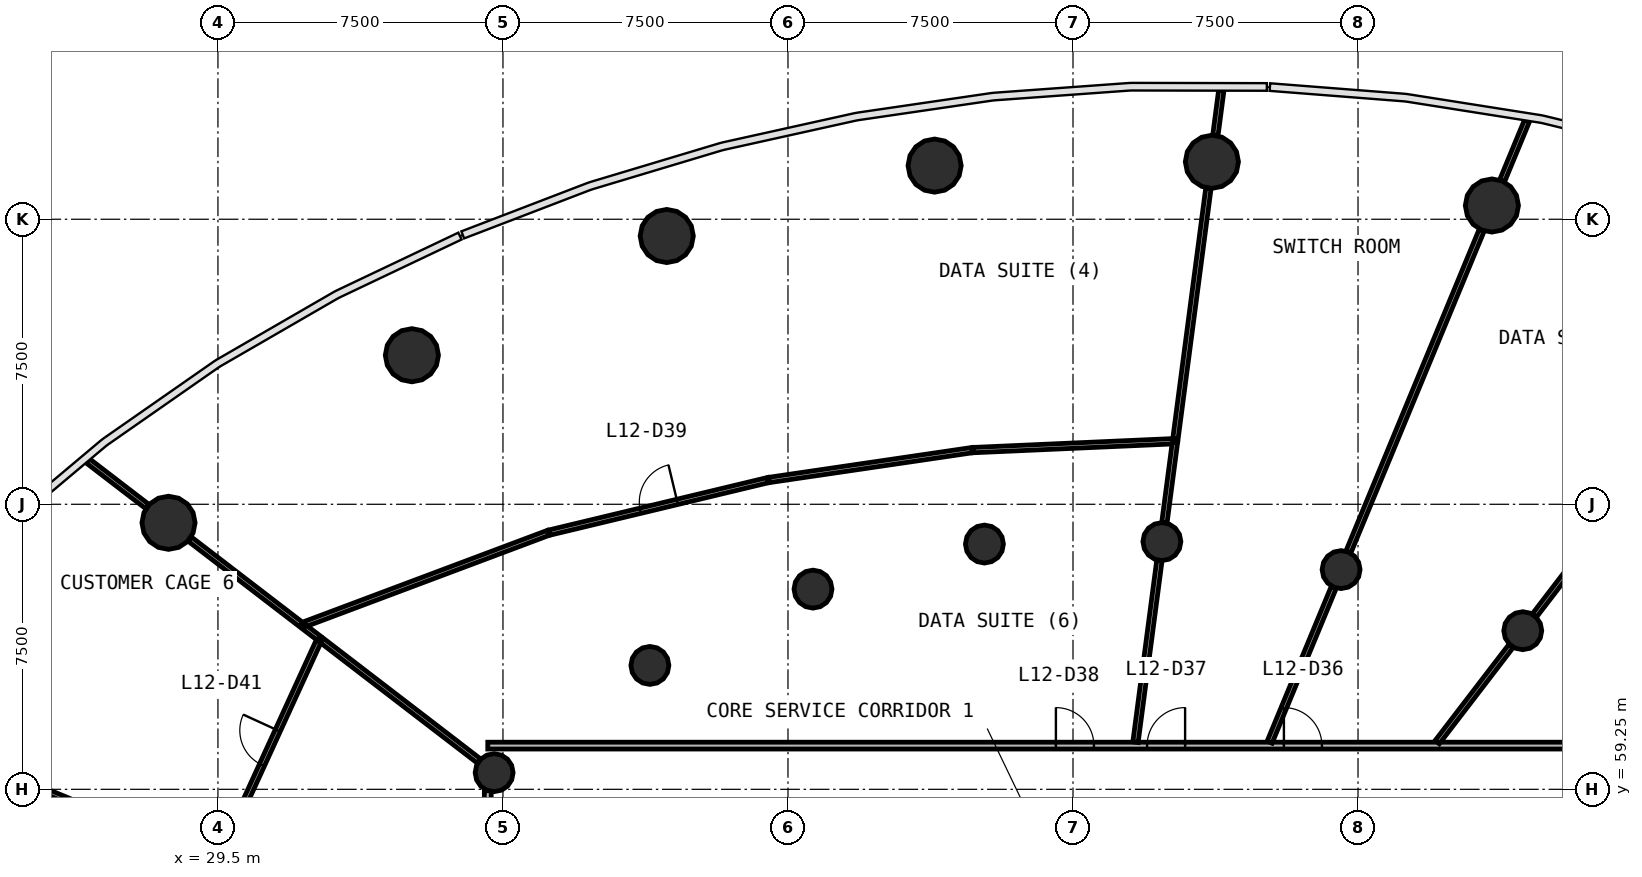
"""IFC4 building model, lengths in metres.
Left out: names, types, materials, properties, quantities, classifications, styles, units other than length and angle.
Written with IfcOpenShell. Run it as: python <this file> out.ifc"""

import sys

from ifc_helpers import new_model, si_unit, direction, frame, frame_2d, origin, origin_2d, place, context, subcontext, project, spatial, rectangle, circle, extrude, source, transform, mapped, element, fill, save


model = new_model("IFC4")
c1 = context("Model", 3, precision=1e-05, world=origin(), true_north=direction((0.0, 1.0)))
c2 = subcontext(c1, "Body", "Model", "MODEL_VIEW")
j1 = project(units=[si_unit("LENGTHUNIT", "METRE"), si_unit("PLANEANGLEUNIT", "RADIAN")], contexts=[c1])
p1 = place(None, origin())
s1 = spatial("IfcSite", under=j1, at=p1, CompositionType="ELEMENT")
p2 = place(p1, origin())
s2 = spatial("IfcBuilding", under=s1, at=p2, CompositionType="ELEMENT")
p3 = place(p2, frame((0.0, 0.0, 53.4)))
s3 = spatial("IfcBuildingStorey", under=s2, at=p3, CompositionType="ELEMENT", Elevation=53.4)
m1 = source(origin(), c2, "Body", "SweptSolid", [
    extrude(circle(Radius=0.7, at=origin_2d()), origin(), (0.0, 0.0, 1.0), 4.4),
])
for number, where, z_axis, x_axis in (
    (1, (63.023, 74.611, 0.0), (0.0, 0.0, 1.0), (1.0, 0.0, 0.0)),
    (2, (55.655, 75.761, 0.0), (0.0, 0.0, 1.0), (1.0, 0.0, 0.0)),
    (3, (48.358, 75.661, 0.0), (0.0, 0.0, 1.0), (1.0, 0.0, 0.0)),
    (4, (41.31, 73.809, 0.0), (0.0, 0.0, 1.0), (1.0, 0.0, 0.0)),
    (5, (34.604, 70.672, 0.0), (0.0, 0.0, 1.0), (1.0, 0.0, 0.0)),
    (6, (28.199, 66.263, 0.0), (0.0, 0.0, 1.0), (1.0, 0.0, 0.0)),
):
    element("IfcColumn", number, at=place(p3, frame(where, z_axis=z_axis, x_axis=x_axis)), inside=s3, PredefinedType="COLUMN", context=c2, shape_type="MappedRepresentation", body=[
        mapped(m1, transform((0.0, 0.0, 0.0), scale=1.0)),
    ])
m2 = source(origin(), c2, "Body", "SweptSolid", [
    extrude(circle(Radius=0.5, at=origin_2d()), origin(), (0.0, 0.0, 1.0), 4.4),
])
for number, where, z_axis, x_axis in (
    (7, (63.835, 63.424, 0.0), (0.0, 0.0, 1.0), (1.0, 0.0, 0.0)),
    (8, (59.055, 65.031, 0.0), (0.0, 0.0, 1.0), (1.0, 0.0, 0.0)),
    (9, (54.339, 65.767, 0.0), (0.0, 0.0, 1.0), (1.0, 0.0, 0.0)),
    (10, (49.669, 65.703, 0.0), (0.0, 0.0, 1.0), (1.0, 0.0, 0.0)),
    (11, (45.158, 64.518, 0.0), (0.0, 0.0, 1.0), (1.0, 0.0, 0.0)),
    (12, (40.866, 62.51, 0.0), (0.0, 0.0, 1.0), (1.0, 0.0, 0.0)),
    (13, (36.768, 59.688, 0.0), (0.0, 0.0, 1.0), (1.0, 0.0, 0.0)),
):
    element("IfcColumn", number, at=place(p3, frame(where, z_axis=z_axis, x_axis=x_axis)), inside=s3, PredefinedType="COLUMN", context=c2, shape_type="MappedRepresentation", body=[
        mapped(m2, transform((0.0, 0.0, 0.0), scale=1.0)),
    ])
p4 = place(p3, frame((36.6, 60.4, 0.0), z_axis=(0.0, 0.0, 1.0), x_axis=(1.0, 0.0, 0.0)))
e14 = element("IfcWall", 14, at=p4, inside=s3, PredefinedType="PARTITIONING", context=c2, shape_type="SweptSolid", body=[
    extrude(rectangle(XDim=30.8, YDim=0.18, at=frame_2d((15.4, 0.0))), origin(), (0.0, 0.0, 1.0), 3.05),
])
p5 = place(p4, frame((20.95, 0.0, 0.0)))
e15 = element("IfcOpeningElement", 15, at=p5, cuts=e14, PredefinedType="OPENING", context=c2, shape_type="SweptSolid", body=[
    extrude(rectangle(XDim=1.0, YDim=2.1, at=frame_2d((0.5, 1.05))), frame((0.0, 0.1, 0.0), z_axis=(0.0, -1.0, 0.0), x_axis=(1.0, 0.0, 0.0)), (0.0, 0.0, 1.0), 0.2),
])
p6 = place(p4, frame((17.35, 0.0, 0.0)))
e16 = element("IfcOpeningElement", 16, at=p6, cuts=e14, PredefinedType="OPENING", context=c2, shape_type="SweptSolid", body=[
    extrude(rectangle(XDim=1.0, YDim=2.1, at=frame_2d((0.5, 1.05))), frame((0.0, 0.1, 0.0), z_axis=(0.0, -1.0, 0.0), x_axis=(1.0, 0.0, 0.0)), (0.0, 0.0, 1.0), 0.2),
])
p7 = place(p4, frame((14.95, 0.0, 0.0)))
e17 = element("IfcOpeningElement", 17, at=p7, cuts=e14, PredefinedType="OPENING", context=c2, shape_type="SweptSolid", body=[
    extrude(rectangle(XDim=1.0, YDim=2.1, at=frame_2d((0.5, 1.05))), frame((0.0, 0.1, 0.0), z_axis=(0.0, -1.0, 0.0), x_axis=(1.0, 0.0, 0.0)), (0.0, 0.0, 1.0), 0.2),
])
p8 = place(p3, frame((36.6, 35.63, 0.0), z_axis=(0.0, 0.0, 1.0), x_axis=(0.0, 1.0, 0.0)))
e18 = element("IfcWall", 18, at=p8, inside=s3, PredefinedType="PARTITIONING", context=c2, shape_type="SweptSolid", body=[
    extrude(rectangle(XDim=23.583, YDim=0.18, at=frame_2d((11.791, 0.0))), origin(), (0.0, 0.0, 1.0), 3.05),
])
p9 = place(p8, frame((11.333, 0.0, 0.0)))
e19 = element("IfcOpeningElement", 19, at=p9, cuts=e18, PredefinedType="OPENING", context=c2, shape_type="SweptSolid", body=[
    extrude(rectangle(XDim=1.0, YDim=2.1, at=frame_2d((0.5, 1.05))), frame((0.0, 0.1, 0.0), z_axis=(0.0, -1.0, 0.0), x_axis=(1.0, 0.0, 0.0)), (0.0, 0.0, 1.0), 0.2),
])
p10 = place(p8, frame((4.532, 0.0, 0.0)))
e20 = element("IfcOpeningElement", 20, at=p10, cuts=e18, PredefinedType="OPENING", context=c2, shape_type="SweptSolid", body=[
    extrude(rectangle(XDim=1.0, YDim=2.1, at=frame_2d((0.5, 1.05))), frame((0.0, 0.1, 0.0), z_axis=(0.0, -1.0, 0.0), x_axis=(1.0, 0.0, 0.0)), (0.0, 0.0, 1.0), 0.2),
])
p11 = place(p3, frame((64.142, 63.824, 0.0), z_axis=(0.0, 0.0, 1.0), x_axis=(0.608770295053, 0.793346537057, 0.0)))
e21 = element("IfcWall", 21, at=p11, inside=s3, PredefinedType="PARTITIONING", context=c2, shape_type="SweptSolid", body=[
    extrude(rectangle(XDim=9.727, YDim=0.14, at=frame_2d((4.864, 0.0))), origin(), (0.0, 0.0, 1.0), 3.05),
])
p12 = place(p3, frame((59.248, 65.498, 0.0), z_axis=(0.0, 0.0, 1.0), x_axis=(0.382672728165, 0.923883966264, 0.0)))
e22 = element("IfcWall", 22, at=p12, inside=s3, PredefinedType="PARTITIONING", context=c2, shape_type="SweptSolid", body=[
    extrude(rectangle(XDim=9.16, YDim=0.14, at=frame_2d((4.58, 0.0))), origin(), (0.0, 0.0, 1.0), 3.05),
])
p13 = place(p3, frame((29.484, 57.326, 0.0), z_axis=(0.0, 0.0, 1.0), x_axis=(-0.923878476662, 0.3826859814, 0.0)))
e23 = element("IfcWall", 23, at=p13, inside=s3, PredefinedType="PARTITIONING", context=c2, shape_type="SweptSolid", body=[
    extrude(rectangle(XDim=7.011, YDim=0.14, at=frame_2d((3.506, 0.0))), origin(), (0.0, 0.0, 1.0), 3.05),
])
p14 = place(p3, frame((38.19, 65.998, 0.0), z_axis=(0.0, 0.0, 1.0), x_axis=(-0.936297270661, -0.35120851492, 0.0)))
e24 = element("IfcWall", 24, at=p14, inside=s3, PredefinedType="PARTITIONING", context=c2, shape_type="SweptSolid", body=[
    extrude(rectangle(XDim=6.919, YDim=0.14, at=frame_2d((3.459, 0.0))), origin(), (0.0, 0.0, 1.0), 3.05),
])
p15 = place(p3, frame((54.687, 68.411, 0.0), z_axis=(0.0, 0.0, 1.0), x_axis=(0.130547690074, 0.99144203089, 0.0)))
e25 = element("IfcWall", 25, at=p15, inside=s3, PredefinedType="PARTITIONING", context=c2, shape_type="SweptSolid", body=[
    extrude(rectangle(XDim=6.71, YDim=0.14, at=frame_2d((3.355, 0.0))), origin(), (0.0, 0.0, 1.0), 3.05),
])
p16 = place(p3, frame((29.497, 57.354, 0.0), z_axis=(0.0, 0.0, 1.0), x_axis=(0.416308805512, 0.909223283057, 0.0)))
e26 = element("IfcWall", 26, at=p16, inside=s3, PredefinedType="PARTITIONING", context=c2, shape_type="SweptSolid", body=[
    extrude(rectangle(XDim=6.441, YDim=0.14, at=frame_2d((3.22, 0.0))), origin(), (0.0, 0.0, 1.0), 3.05),
])
p17 = place(p16, frame((2.791, 0.0, 0.0)))
e27 = element("IfcOpeningElement", 27, at=p17, cuts=e26, PredefinedType="OPENING", context=c2, shape_type="SweptSolid", body=[
    extrude(rectangle(XDim=1.0, YDim=2.1, at=frame_2d((0.5, 1.05))), frame((0.0, 0.08, 0.0), z_axis=(0.0, -1.0, 0.0), x_axis=(1.0, 0.0, 0.0)), (0.0, 0.0, 1.0), 0.16),
])
p18 = place(p3, frame((38.219, 66.005, 0.0), z_axis=(0.0, 0.0, 1.0), x_axis=(0.972386552633, 0.233376074734, 0.0)))
e28 = element("IfcWall", 28, at=p18, inside=s3, PredefinedType="PARTITIONING", context=c2, shape_type="SweptSolid", body=[
    extrude(rectangle(XDim=5.915, YDim=0.14, at=frame_2d((2.958, 0.0))), origin(), (0.0, 0.0, 1.0), 3.05),
])
p19 = place(p18, frame((2.465, 0.0, 0.0)))
e29 = element("IfcOpeningElement", 29, at=p19, cuts=e28, PredefinedType="OPENING", context=c2, shape_type="SweptSolid", body=[
    extrude(rectangle(XDim=1.0, YDim=2.1, at=frame_2d((0.5, 1.05))), frame((0.0, 0.08, 0.0), z_axis=(0.0, -1.0, 0.0), x_axis=(1.0, 0.0, 0.0)), (0.0, 0.0, 1.0), 0.16),
])
p20 = place(p3, frame((49.344, 68.175, 0.0), z_axis=(0.0, 0.0, 1.0), x_axis=(-0.989377499091, -0.145369062366, 0.0)))
e30 = element("IfcWall", 30, at=p20, inside=s3, PredefinedType="PARTITIONING", context=c2, shape_type="SweptSolid", body=[
    extrude(rectangle(XDim=5.401, YDim=0.14, at=frame_2d((2.701, 0.0))), origin(), (0.0, 0.0, 1.0), 3.05),
])
p21 = place(p3, frame((54.657, 68.409, 0.0), z_axis=(0.0, 0.0, 1.0), x_axis=(-0.999023656057, -0.044178440869, 0.0)))
e31 = element("IfcWall", 31, at=p21, inside=s3, PredefinedType="PARTITIONING", context=c2, shape_type="SweptSolid", body=[
    extrude(rectangle(XDim=5.289, YDim=0.14, at=frame_2d((2.644, 0.0))), origin(), (0.0, 0.0, 1.0), 3.05),
])
p22 = place(p3, frame((36.367, 59.995, 0.0), z_axis=(0.0, 0.0, 1.0), x_axis=(-0.793353550187, 0.608761155467, 0.0)))
e32 = element("IfcWall", 32, at=p22, inside=s3, PredefinedType="PARTITIONING", context=c2, shape_type="SweptSolid", body=[
    extrude(rectangle(XDim=5.208, YDim=0.14, at=frame_2d((2.604, 0.0))), origin(), (0.0, 0.0, 1.0), 3.05),
])
p23 = place(p3, frame((53.644, 60.49, 0.0), z_axis=(0.0, 0.0, 1.0), x_axis=(0.130523979823, 0.991445152639, 0.0)))
e33 = element("IfcWall", 33, at=p23, inside=s3, PredefinedType="PARTITIONING", context=c2, shape_type="SweptSolid", body=[
    extrude(rectangle(XDim=4.818, YDim=0.14, at=frame_2d((2.409, 0.0))), origin(), (0.0, 0.0, 1.0), 3.05),
])
p24 = place(p3, frame((57.174, 60.49, 0.0), z_axis=(0.0, 0.0, 1.0), x_axis=(0.382672831764, 0.923883923353, 0.0)))
e34 = element("IfcWall", 34, at=p24, inside=s3, PredefinedType="PARTITIONING", context=c2, shape_type="SweptSolid", body=[
    extrude(rectangle(XDim=4.41, YDim=0.14, at=frame_2d((2.205, 0.0))), origin(), (0.0, 0.0, 1.0), 3.05),
])
p25 = place(p3, frame((31.688, 63.586, 0.0), z_axis=(0.0, 0.0, 1.0), x_axis=(-0.793375408023, 0.608732668701, 0.0)))
e35 = element("IfcWall", 35, at=p25, inside=s3, PredefinedType="PARTITIONING", context=c2, shape_type="SweptSolid", body=[
    extrude(rectangle(XDim=3.693, YDim=0.14, at=frame_2d((1.847, 0.0))), origin(), (0.0, 0.0, 1.0), 3.05),
])
p26 = place(p3, frame((61.584, 60.49, 0.0), z_axis=(0.0, 0.0, 1.0), x_axis=(0.60874605662, 0.793365135703, 0.0)))
e36 = element("IfcWall", 36, at=p26, inside=s3, PredefinedType="PARTITIONING", context=c2, shape_type="SweptSolid", body=[
    extrude(rectangle(XDim=3.194, YDim=0.14, at=frame_2d((1.597, 0.0))), origin(), (0.0, 0.0, 1.0), 3.05),
])
p27 = place(p3, frame((54.405, 66.267, 0.0), z_axis=(0.0, 0.0, 1.0), x_axis=(0.130430814721, 0.991457413393, 0.0)))
e37 = element("IfcWall", 37, at=p27, inside=s3, PredefinedType="PARTITIONING", context=c2, shape_type="SweptSolid", body=[
    extrude(rectangle(XDim=2.132, YDim=0.14, at=frame_2d((1.066, 0.0))), origin(), (0.0, 0.0, 1.0), 3.05),
])
p28 = place(p3, frame((27.641, 66.691, 0.0), z_axis=(0.0, 0.0, 1.0), x_axis=(-0.793312100237, 0.608815170325, 0.0)))
e38 = element("IfcWall", 38, at=p28, inside=s3, PredefinedType="PARTITIONING", context=c2, shape_type="SweptSolid", body=[
    extrude(rectangle(XDim=1.977, YDim=0.14, at=frame_2d((0.989, 0.0))), origin(), (0.0, 0.0, 1.0), 3.05),
])
p29 = place(p3, frame((63.292, 75.263, 0.0), z_axis=(0.0, 0.0, 1.0), x_axis=(0.382632674553, 0.923900555452, 0.0)))
e39 = element("IfcWall", 39, at=p29, inside=s3, PredefinedType="PARTITIONING", context=c2, shape_type="SweptSolid", body=[
    extrude(rectangle(XDim=1.714, YDim=0.14, at=frame_2d((0.857, 0.0))), origin(), (0.0, 0.0, 1.0), 3.05),
])
p30 = place(p3, frame((55.747, 76.46, 0.0), z_axis=(0.0, 0.0, 1.0), x_axis=(0.130449264586, 0.991454986053, 0.0)))
e40 = element("IfcWall", 40, at=p30, inside=s3, PredefinedType="PARTITIONING", context=c2, shape_type="SweptSolid", body=[
    extrude(rectangle(XDim=1.203, YDim=0.14, at=frame_2d((0.602, 0.0))), origin(), (0.0, 0.0, 1.0), 3.05),
])
p31 = place(p3, frame((32.155, 63.228, 0.0), z_axis=(0.0, 0.0, 1.0), x_axis=(-0.793176766219, 0.608991475745, 0.0)))
e41 = element("IfcWall", 41, at=p31, inside=s3, PredefinedType="PARTITIONING", context=c2, shape_type="SweptSolid", body=[
    extrude(rectangle(XDim=0.476, YDim=0.14, at=frame_2d((0.238, 0.0))), origin(), (0.0, 0.0, 1.0), 3.05),
])
m3 = source(origin(), c2, "Body", "SweptSolid", [
    extrude(rectangle(XDim=1.0, YDim=2.1, at=frame_2d((0.5, 1.05))), frame((0.0, 0.025, 0.0), z_axis=(0.0, -1.0, 0.0), x_axis=(1.0, 0.0, 0.0)), (0.0, 0.0, 1.0), 0.05),
])
p32 = place(p5, origin())
e42 = element("IfcDoor", 42, at=p32, inside=s3, OperationType="SINGLE_SWING_LEFT", PredefinedType="DOOR", context=c2, shape_type="MappedRepresentation", body=[
    mapped(m3, transform((0.0, 0.0, 0.0), scale=1.0)),
])
fill(e15, e42)
p33 = place(p6, origin())
e43 = element("IfcDoor", 43, at=p33, inside=s3, OperationType="SINGLE_SWING_RIGHT", PredefinedType="DOOR", context=c2, shape_type="MappedRepresentation", body=[
    mapped(m3, transform((0.0, 0.0, 0.0), scale=1.0)),
])
fill(e16, e43)
p34 = place(p7, origin())
e44 = element("IfcDoor", 44, at=p34, inside=s3, OperationType="SINGLE_SWING_LEFT", PredefinedType="DOOR", context=c2, shape_type="MappedRepresentation", body=[
    mapped(m3, transform((0.0, 0.0, 0.0), scale=1.0)),
])
fill(e17, e44)
p35 = place(p19, origin())
e45 = element("IfcDoor", 45, at=p35, inside=s3, OperationType="SINGLE_SWING_RIGHT", PredefinedType="DOOR", context=c2, shape_type="MappedRepresentation", body=[
    mapped(m3, transform((0.0, 0.0, 0.0), scale=1.0)),
])
fill(e29, e45)
p36 = place(p17, origin())
e46 = element("IfcDoor", 46, at=p36, inside=s3, OperationType="SINGLE_SWING_RIGHT", PredefinedType="DOOR", context=c2, shape_type="MappedRepresentation", body=[
    mapped(m3, transform((0.0, 0.0, 0.0), scale=1.0)),
])
fill(e27, e46)
save(model, sys.argv[1])
